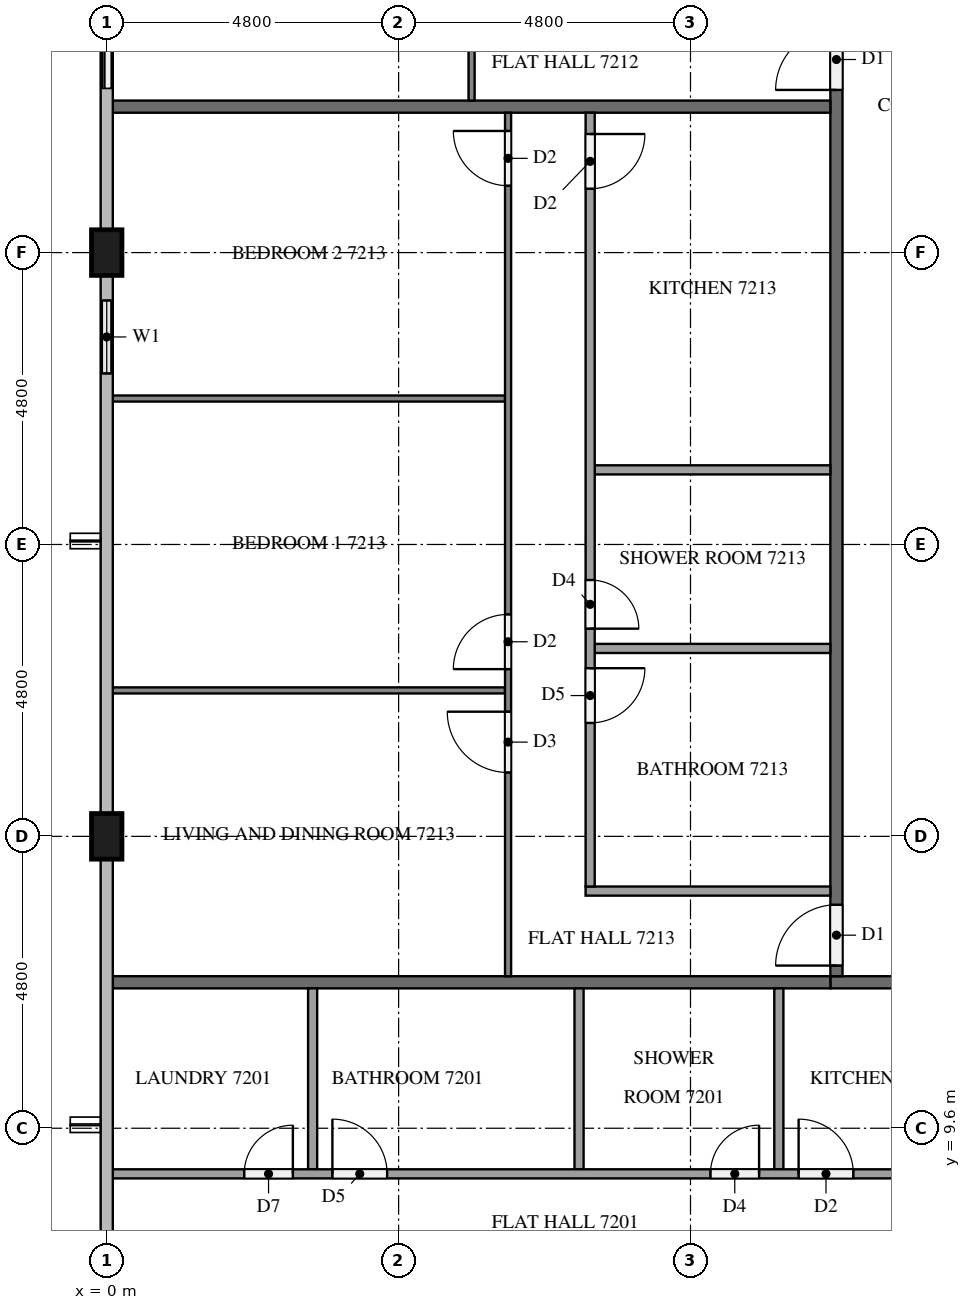
"""IFC4 building model, lengths in metres.
Left out: names, types, materials, properties, quantities, classifications, styles, units other than length and angle.
Written with IfcOpenShell. Run it as: python <this file> out.ifc"""

import sys

from ifc_helpers import new_model, si_unit, direction, frame, frame_2d, origin, origin_2d, place, context, subcontext, project, spatial, rectangle, extrude, element, fill, save


model = new_model("IFC4")
c1 = context("Model", 3, precision=1e-05, world=origin(), true_north=direction((0.0, 1.0)))
c2 = subcontext(c1, "Body", "Model", "MODEL_VIEW")
j1 = project(units=[si_unit("LENGTHUNIT", "METRE"), si_unit("PLANEANGLEUNIT", "RADIAN")], contexts=[c1])
p1 = place(None, origin())
s1 = spatial("IfcSite", under=j1, at=p1, CompositionType="ELEMENT")
p2 = place(p1, origin())
s2 = spatial("IfcBuilding", under=s1, at=p2, CompositionType="ELEMENT")
p3 = place(p2, frame((0.0, 0.0, 275.6)))
s3 = spatial("IfcBuildingStorey", under=s2, at=p3, CompositionType="ELEMENT", Elevation=275.6)
for number, where, z_axis, x_axis in (
    (1, (0.0, 24.0, 0.0), (0.0, 0.0, 1.0), (0.0, 1.0, 0.0)),
    (2, (0.0, 14.4, 0.0), (0.0, 0.0, 1.0), (0.0, 1.0, 0.0)),
):
    element("IfcColumn", number, at=place(p3, frame(where, z_axis=z_axis, x_axis=x_axis)), inside=s3, PredefinedType="COLUMN", context=c2, shape_type="SweptSolid", body=[
        extrude(rectangle(XDim=0.75, YDim=0.5, at=origin_2d()), origin(), (0.0, 0.0, 1.0), 3.2),
    ])
p4 = place(p3, frame((0.0, 28.8, 0.0), z_axis=(0.0, 0.0, 1.0), x_axis=(0.0, -1.0, 0.0)))
e3 = element("IfcWall", 3, at=p4, inside=s3, PredefinedType="SOLIDWALL", context=c2, shape_type="SweptSolid", body=[
    extrude(rectangle(XDim=2.4, YDim=0.15, at=frame_2d((1.2, 0.0))), origin(), (0.0, 0.0, 1.0), 3.2),
])
p5 = place(p4, frame((0.3, 0.0, 0.0)))
e4 = element("IfcOpeningElement", 4, at=p5, cuts=e3, PredefinedType="OPENING", context=c2, shape_type="SweptSolid", body=[
    extrude(rectangle(XDim=1.8, YDim=2.4, at=frame_2d((0.9, 1.2))), frame((0.0, 0.085, 0.0), z_axis=(0.0, -1.0, 0.0), x_axis=(1.0, 0.0, 0.0)), (0.0, 0.0, 1.0), 0.17),
])
p6 = place(p3, frame((0.0, 23.625, 0.0), z_axis=(0.0, 0.0, 1.0), x_axis=(0.0, -1.0, 0.0)))
e5 = element("IfcWall", 5, at=p6, inside=s3, PredefinedType="SOLIDWALL", context=c2, shape_type="SweptSolid", body=[
    extrude(rectangle(XDim=2.025, YDim=0.15, at=frame_2d((1.012, 0.0))), origin(), (0.0, 0.0, 1.0), 3.2),
])
p7 = place(p6, frame((0.413, 0.0, 0.9)))
e6 = element("IfcOpeningElement", 6, at=p7, cuts=e5, PredefinedType="OPENING", context=c2, shape_type="SweptSolid", body=[
    extrude(rectangle(XDim=1.2, YDim=1.4, at=frame_2d((0.6, 0.7))), frame((0.0, 0.085, 0.0), z_axis=(0.0, -1.0, 0.0), x_axis=(1.0, 0.0, 0.0)), (0.0, 0.0, 1.0), 0.17),
])
p8 = place(p3, frame((50.5, 12.0, 0.0), z_axis=(0.0, 0.0, 1.0), x_axis=(-1.0, 0.0, 0.0)))
e7 = element("IfcWall", 7, at=p8, inside=s3, PredefinedType="PARTITIONING", context=c2, shape_type="SweptSolid", body=[
    extrude(rectangle(XDim=38.6, YDim=0.2, at=frame_2d((19.3, 0.0))), origin(), (0.0, 0.0, 1.0), 3.2),
])
p9 = place(p8, frame((31.525, 0.0, 0.0)))
e8 = element("IfcOpeningElement", 8, at=p9, cuts=e7, PredefinedType="OPENING", context=c2, shape_type="SweptSolid", body=[
    extrude(rectangle(XDim=1.1, YDim=2.1, at=frame_2d((0.55, 1.05))), frame((0.0, 0.11, 0.0), z_axis=(0.0, -1.0, 0.0), x_axis=(1.0, 0.0, 0.0)), (0.0, 0.0, 1.0), 0.22),
])
p10 = place(p8, frame((19.575, 0.0, 0.0)))
e9 = element("IfcOpeningElement", 9, at=p10, cuts=e7, PredefinedType="OPENING", context=c2, shape_type="SweptSolid", body=[
    extrude(rectangle(XDim=1.0, YDim=2.1, at=frame_2d((0.5, 1.05))), frame((0.0, 0.11, 0.0), z_axis=(0.0, -1.0, 0.0), x_axis=(1.0, 0.0, 0.0)), (0.0, 0.0, 1.0), 0.22),
])
p11 = place(p8, frame((18.025, 0.0, 0.0)))
e10 = element("IfcOpeningElement", 10, at=p11, cuts=e7, PredefinedType="OPENING", context=c2, shape_type="SweptSolid", body=[
    extrude(rectangle(XDim=1.0, YDim=2.1, at=frame_2d((0.5, 1.05))), frame((0.0, 0.11, 0.0), z_axis=(0.0, -1.0, 0.0), x_axis=(1.0, 0.0, 0.0)), (0.0, 0.0, 1.0), 0.22),
])
p12 = place(p8, frame((1.225, 0.0, 0.0)))
e11 = element("IfcOpeningElement", 11, at=p12, cuts=e7, PredefinedType="OPENING", context=c2, shape_type="SweptSolid", body=[
    extrude(rectangle(XDim=1.0, YDim=2.1, at=frame_2d((0.5, 1.05))), frame((0.0, 0.11, 0.0), z_axis=(0.0, -1.0, 0.0), x_axis=(1.0, 0.0, 0.0)), (0.0, 0.0, 1.0), 0.22),
])
p13 = place(p3, frame((12.0, 12.1, 0.0), z_axis=(0.0, 0.0, 1.0), x_axis=(0.0, 1.0, 0.0)))
e12 = element("IfcWall", 12, at=p13, inside=s3, PredefinedType="PARTITIONING", context=c2, shape_type="SweptSolid", body=[
    extrude(rectangle(XDim=28.6, YDim=0.2, at=frame_2d((14.3, 0.0))), origin(), (0.0, 0.0, 1.0), 3.2),
])
p14 = place(p13, frame((24.175, 0.0, 0.0)))
e13 = element("IfcOpeningElement", 13, at=p14, cuts=e12, PredefinedType="OPENING", context=c2, shape_type="SweptSolid", body=[
    extrude(rectangle(XDim=1.0, YDim=2.1, at=frame_2d((0.5, 1.05))), frame((0.0, 0.11, 0.0), z_axis=(0.0, -1.0, 0.0), x_axis=(1.0, 0.0, 0.0)), (0.0, 0.0, 1.0), 0.22),
])
p15 = place(p13, frame((14.575, 0.0, 0.0)))
e14 = element("IfcOpeningElement", 14, at=p15, cuts=e12, PredefinedType="OPENING", context=c2, shape_type="SweptSolid", body=[
    extrude(rectangle(XDim=1.0, YDim=2.1, at=frame_2d((0.5, 1.05))), frame((0.0, 0.11, 0.0), z_axis=(0.0, -1.0, 0.0), x_axis=(1.0, 0.0, 0.0)), (0.0, 0.0, 1.0), 0.22),
])
p16 = place(p13, frame((0.175, 0.0, 0.0)))
e15 = element("IfcOpeningElement", 15, at=p16, cuts=e12, PredefinedType="OPENING", context=c2, shape_type="SweptSolid", body=[
    extrude(rectangle(XDim=1.0, YDim=2.1, at=frame_2d((0.5, 1.05))), frame((0.0, 0.11, 0.0), z_axis=(0.0, -1.0, 0.0), x_axis=(1.0, 0.0, 0.0)), (0.0, 0.0, 1.0), 0.22),
])
for number, where, z_axis, x_axis in (
    (16, (0.1, 12.0, 0.0), (0.0, 0.0, 1.0), (1.0, 0.0, 0.0)),
    (17, (0.1, 26.4, 0.0), (0.0, 0.0, 1.0), (1.0, 0.0, 0.0)),
):
    element("IfcWall", number, at=place(p3, frame(where, z_axis=z_axis, x_axis=x_axis)), inside=s3, PredefinedType="PARTITIONING", context=c2, shape_type="SweptSolid", body=[
        extrude(rectangle(XDim=11.8, YDim=0.2, at=frame_2d((5.9, 0.0))), origin(), (0.0, 0.0, 1.0), 3.2),
    ])
for number, where, z_axis, x_axis in (
    (18, (11.053, 11.9, 0.0), (0.0, 0.0, 1.0), (0.0, -1.0, 0.0)),
    (19, (7.767, 11.9, 0.0), (0.0, 0.0, 1.0), (0.0, -1.0, 0.0)),
    (20, (3.386, 11.9, 0.0), (0.0, 0.0, 1.0), (0.0, -1.0, 0.0)),
):
    element("IfcWall", number, at=place(p3, frame(where, z_axis=z_axis, x_axis=x_axis)), inside=s3, PredefinedType="PARTITIONING", context=c2, shape_type="SweptSolid", body=[
        extrude(rectangle(XDim=2.975, YDim=0.15, at=frame_2d((1.487, 0.0))), origin(), (0.0, 0.0, 1.0), 3.2),
    ])
p17 = place(p3, frame((0.1, 8.85, 0.0), z_axis=(0.0, 0.0, 1.0), x_axis=(1.0, 0.0, 0.0)))
e21 = element("IfcWall", 21, at=p17, inside=s3, PredefinedType="PARTITIONING", context=c2, shape_type="SweptSolid", body=[
    extrude(rectangle(XDim=17.525, YDim=0.15, at=frame_2d((8.762, 0.0))), origin(), (0.0, 0.0, 1.0), 3.2),
])
p18 = place(p17, frame((11.278, 0.0, 0.0)))
e22 = element("IfcOpeningElement", 22, at=p18, cuts=e21, PredefinedType="OPENING", context=c2, shape_type="SweptSolid", body=[
    extrude(rectangle(XDim=0.9, YDim=2.1, at=frame_2d((0.45, 1.05))), frame((0.0, 0.085, 0.0), z_axis=(0.0, -1.0, 0.0), x_axis=(1.0, 0.0, 0.0)), (0.0, 0.0, 1.0), 0.17),
])
p19 = place(p17, frame((9.828, 0.0, 0.0)))
e23 = element("IfcOpeningElement", 23, at=p19, cuts=e21, PredefinedType="OPENING", context=c2, shape_type="SweptSolid", body=[
    extrude(rectangle(XDim=0.8, YDim=2.1, at=frame_2d((0.4, 1.05))), frame((0.0, 0.085, 0.0), z_axis=(0.0, -1.0, 0.0), x_axis=(1.0, 0.0, 0.0)), (0.0, 0.0, 1.0), 0.17),
])
p20 = place(p17, frame((3.611, 0.0, 0.0)))
e24 = element("IfcOpeningElement", 24, at=p20, cuts=e21, PredefinedType="OPENING", context=c2, shape_type="SweptSolid", body=[
    extrude(rectangle(XDim=0.9, YDim=2.1, at=frame_2d((0.45, 1.05))), frame((0.0, 0.085, 0.0), z_axis=(0.0, -1.0, 0.0), x_axis=(1.0, 0.0, 0.0)), (0.0, 0.0, 1.0), 0.17),
])
p21 = place(p17, frame((2.161, 0.0, 0.0)))
e25 = element("IfcOpeningElement", 25, at=p21, cuts=e21, PredefinedType="OPENING", context=c2, shape_type="SweptSolid", body=[
    extrude(rectangle(XDim=0.8, YDim=2.1, at=frame_2d((0.4, 1.05))), frame((0.0, 0.085, 0.0), z_axis=(0.0, -1.0, 0.0), x_axis=(1.0, 0.0, 0.0)), (0.0, 0.0, 1.0), 0.17),
])
p22 = place(p3, frame((6.0, 26.5, 0.0), z_axis=(0.0, 0.0, 1.0), x_axis=(0.0, 1.0, 0.0)))
e26 = element("IfcWall", 26, at=p22, inside=s3, PredefinedType="PARTITIONING", context=c2, shape_type="SweptSolid", body=[
    extrude(rectangle(XDim=9.4, YDim=0.1, at=frame_2d((4.7, 0.0))), origin(), (0.0, 0.0, 1.0), 3.2),
])
p23 = place(p22, frame((3.35, 0.0, 0.0)))
e27 = element("IfcOpeningElement", 27, at=p23, cuts=e26, PredefinedType="OPENING", context=c2, shape_type="SweptSolid", body=[
    extrude(rectangle(XDim=1.0, YDim=2.1, at=frame_2d((0.5, 1.05))), frame((0.0, 0.06, 0.0), z_axis=(0.0, -1.0, 0.0), x_axis=(1.0, 0.0, 0.0)), (0.0, 0.0, 1.0), 0.12),
])
p24 = place(p22, frame((5.05, 0.0, 0.0)))
e28 = element("IfcOpeningElement", 28, at=p24, cuts=e26, PredefinedType="OPENING", context=c2, shape_type="SweptSolid", body=[
    extrude(rectangle(XDim=0.9, YDim=2.1, at=frame_2d((0.45, 1.05))), frame((0.0, 0.06, 0.0), z_axis=(0.0, -1.0, 0.0), x_axis=(1.0, 0.0, 0.0)), (0.0, 0.0, 1.0), 0.12),
])
for number, where, z_axis, x_axis in (
    (29, (6.55, 16.8, 0.0), (0.0, 0.0, 1.0), (-1.0, 0.0, 0.0)),
    (30, (6.55, 21.6, 0.0), (0.0, 0.0, 1.0), (-1.0, 0.0, 0.0)),
):
    element("IfcWall", number, at=place(p3, frame(where, z_axis=z_axis, x_axis=x_axis)), inside=s3, PredefinedType="PARTITIONING", context=c2, shape_type="SweptSolid", body=[
        extrude(rectangle(XDim=6.45, YDim=0.1, at=frame_2d((3.225, 0.0))), origin(), (0.0, 0.0, 1.0), 3.2),
    ])
p25 = place(p3, frame((6.6, 12.1, 0.0), z_axis=(0.0, 0.0, 1.0), x_axis=(0.0, 1.0, 0.0)))
e31 = element("IfcWall", 31, at=p25, inside=s3, PredefinedType="PARTITIONING", context=c2, shape_type="SweptSolid", body=[
    extrude(rectangle(XDim=14.2, YDim=0.1, at=frame_2d((7.1, 0.0))), origin(), (0.0, 0.0, 1.0), 3.2),
])
p26 = place(p25, frame((3.35, 0.0, 0.0)))
e32 = element("IfcOpeningElement", 32, at=p26, cuts=e31, PredefinedType="OPENING", context=c2, shape_type="SweptSolid", body=[
    extrude(rectangle(XDim=1.0, YDim=2.1, at=frame_2d((0.5, 1.05))), frame((0.0, 0.06, 0.0), z_axis=(0.0, -1.0, 0.0), x_axis=(1.0, 0.0, 0.0)), (0.0, 0.0, 1.0), 0.12),
])
p27 = place(p25, frame((5.05, 0.0, 0.0)))
e33 = element("IfcOpeningElement", 33, at=p27, cuts=e31, PredefinedType="OPENING", context=c2, shape_type="SweptSolid", body=[
    extrude(rectangle(XDim=0.9, YDim=2.1, at=frame_2d((0.45, 1.05))), frame((0.0, 0.06, 0.0), z_axis=(0.0, -1.0, 0.0), x_axis=(1.0, 0.0, 0.0)), (0.0, 0.0, 1.0), 0.12),
])
p28 = place(p25, frame((13.0, 0.0, 0.0)))
e34 = element("IfcOpeningElement", 34, at=p28, cuts=e31, PredefinedType="OPENING", context=c2, shape_type="SweptSolid", body=[
    extrude(rectangle(XDim=0.9, YDim=2.1, at=frame_2d((0.45, 1.05))), frame((0.0, 0.06, 0.0), z_axis=(0.0, -1.0, 0.0), x_axis=(1.0, 0.0, 0.0)), (0.0, 0.0, 1.0), 0.12),
])
for number, where, z_axis, x_axis in (
    (35, (11.9, 17.49, 0.0), (0.0, 0.0, 1.0), (-1.0, 0.0, 0.0)),
    (36, (11.9, 20.427, 0.0), (0.0, 0.0, 1.0), (-1.0, 0.0, 0.0)),
):
    element("IfcWall", number, at=place(p3, frame(where, z_axis=z_axis, x_axis=x_axis)), inside=s3, PredefinedType="PARTITIONING", context=c2, shape_type="SweptSolid", body=[
        extrude(rectangle(XDim=3.875, YDim=0.15, at=frame_2d((1.938, 0.0))), origin(), (0.0, 0.0, 1.0), 3.2),
    ])
p29 = place(p3, frame((11.9, 13.5, 0.0), z_axis=(0.0, 0.0, 1.0), x_axis=(-1.0, 0.0, 0.0)))
e37 = element("IfcWall", 37, at=p29, inside=s3, PredefinedType="PARTITIONING", context=c2, shape_type="SweptSolid", body=[
    extrude(rectangle(XDim=4.025, YDim=0.15, at=frame_2d((2.012, 0.0))), origin(), (0.0, 0.0, 1.0), 3.2),
])
p30 = place(p3, frame((7.95, 26.3, 0.0), z_axis=(0.0, 0.0, 1.0), x_axis=(0.0, -1.0, 0.0)))
e38 = element("IfcWall", 38, at=p30, inside=s3, PredefinedType="PARTITIONING", context=c2, shape_type="SweptSolid", body=[
    extrude(rectangle(XDim=12.725, YDim=0.15, at=frame_2d((6.363, 0.0))), origin(), (0.0, 0.0, 1.0), 3.2),
])
p31 = place(p30, frame((9.135, 0.0, 0.0)))
e39 = element("IfcOpeningElement", 39, at=p31, cuts=e38, PredefinedType="OPENING", context=c2, shape_type="SweptSolid", body=[
    extrude(rectangle(XDim=0.9, YDim=2.1, at=frame_2d((0.45, 1.05))), frame((0.0, 0.085, 0.0), z_axis=(0.0, -1.0, 0.0), x_axis=(1.0, 0.0, 0.0)), (0.0, 0.0, 1.0), 0.17),
])
p32 = place(p30, frame((7.685, 0.0, 0.0)))
e40 = element("IfcOpeningElement", 40, at=p32, cuts=e38, PredefinedType="OPENING", context=c2, shape_type="SweptSolid", body=[
    extrude(rectangle(XDim=0.8, YDim=2.1, at=frame_2d((0.4, 1.05))), frame((0.0, 0.085, 0.0), z_axis=(0.0, -1.0, 0.0), x_axis=(1.0, 0.0, 0.0)), (0.0, 0.0, 1.0), 0.17),
])
p33 = place(p30, frame((0.35, 0.0, 0.0)))
e41 = element("IfcOpeningElement", 41, at=p33, cuts=e38, PredefinedType="OPENING", context=c2, shape_type="SweptSolid", body=[
    extrude(rectangle(XDim=0.9, YDim=2.1, at=frame_2d((0.45, 1.05))), frame((0.0, 0.085, 0.0), z_axis=(0.0, -1.0, 0.0), x_axis=(1.0, 0.0, 0.0)), (0.0, 0.0, 1.0), 0.17),
])
p34 = place(p5, origin())
e42 = element("IfcDoor", 42, at=p34, inside=s3, OperationType="SLIDING_TO_RIGHT", PredefinedType="DOOR", context=c2, shape_type="SweptSolid", body=[
    extrude(rectangle(XDim=1.8, YDim=2.4, at=frame_2d((0.9, 1.2))), frame((0.0, 0.025, 0.0), z_axis=(0.0, -1.0, 0.0), x_axis=(1.0, 0.0, 0.0)), (0.0, 0.0, 1.0), 0.05),
])
fill(e4, e42)
p35 = place(p7, origin())
e43 = element("IfcWindow", 43, at=p35, inside=s3, PartitioningType="SINGLE_PANEL", PredefinedType="WINDOW", context=c2, shape_type="SweptSolid", body=[
    extrude(rectangle(XDim=1.2, YDim=1.4, at=frame_2d((0.6, 0.7))), frame((0.0, 0.03, 0.0), z_axis=(0.0, -1.0, 0.0), x_axis=(1.0, 0.0, 0.0)), (0.0, 0.0, 1.0), 0.06),
])
fill(e6, e43)
p36 = place(p15, origin())
e44 = element("IfcDoor", 44, at=p36, inside=s3, OperationType="SINGLE_SWING_LEFT", PredefinedType="DOOR", context=c2, shape_type="SweptSolid", body=[
    extrude(rectangle(XDim=1.0, YDim=2.1, at=frame_2d((0.5, 1.05))), frame((0.0, 0.025, 0.0), z_axis=(0.0, -1.0, 0.0), x_axis=(1.0, 0.0, 0.0)), (0.0, 0.0, 1.0), 0.05),
])
fill(e14, e44)
p37 = place(p16, origin())
e45 = element("IfcDoor", 45, at=p37, inside=s3, OperationType="SINGLE_SWING_LEFT", PredefinedType="DOOR", context=c2, shape_type="SweptSolid", body=[
    extrude(rectangle(XDim=1.0, YDim=2.1, at=frame_2d((0.5, 1.05))), frame((0.0, 0.025, 0.0), z_axis=(0.0, -1.0, 0.0), x_axis=(1.0, 0.0, 0.0)), (0.0, 0.0, 1.0), 0.05),
])
fill(e15, e45)
p38 = place(p18, origin())
e46 = element("IfcDoor", 46, at=p38, inside=s3, OperationType="SINGLE_SWING_LEFT", PredefinedType="DOOR", context=c2, shape_type="SweptSolid", body=[
    extrude(rectangle(XDim=0.9, YDim=2.1, at=frame_2d((0.45, 1.05))), frame((0.0, 0.025, 0.0), z_axis=(0.0, -1.0, 0.0), x_axis=(1.0, 0.0, 0.0)), (0.0, 0.0, 1.0), 0.05),
])
fill(e22, e46)
p39 = place(p19, origin())
e47 = element("IfcDoor", 47, at=p39, inside=s3, OperationType="SINGLE_SWING_RIGHT", PredefinedType="DOOR", context=c2, shape_type="SweptSolid", body=[
    extrude(rectangle(XDim=0.8, YDim=2.1, at=frame_2d((0.4, 1.05))), frame((0.0, 0.025, 0.0), z_axis=(0.0, -1.0, 0.0), x_axis=(1.0, 0.0, 0.0)), (0.0, 0.0, 1.0), 0.05),
])
fill(e23, e47)
p40 = place(p20, origin())
e48 = element("IfcDoor", 48, at=p40, inside=s3, OperationType="SINGLE_SWING_LEFT", PredefinedType="DOOR", context=c2, shape_type="SweptSolid", body=[
    extrude(rectangle(XDim=0.9, YDim=2.1, at=frame_2d((0.45, 1.05))), frame((0.0, 0.025, 0.0), z_axis=(0.0, -1.0, 0.0), x_axis=(1.0, 0.0, 0.0)), (0.0, 0.0, 1.0), 0.05),
])
fill(e24, e48)
p41 = place(p21, origin())
e49 = element("IfcDoor", 49, at=p41, inside=s3, OperationType="SINGLE_SWING_RIGHT", PredefinedType="DOOR", context=c2, shape_type="SweptSolid", body=[
    extrude(rectangle(XDim=0.8, YDim=2.1, at=frame_2d((0.4, 1.05))), frame((0.0, 0.025, 0.0), z_axis=(0.0, -1.0, 0.0), x_axis=(1.0, 0.0, 0.0)), (0.0, 0.0, 1.0), 0.05),
])
fill(e25, e49)
p42 = place(p26, origin())
e50 = element("IfcDoor", 50, at=p42, inside=s3, OperationType="SINGLE_SWING_RIGHT", PredefinedType="DOOR", context=c2, shape_type="SweptSolid", body=[
    extrude(rectangle(XDim=1.0, YDim=2.1, at=frame_2d((0.5, 1.05))), frame((0.0, 0.025, 0.0), z_axis=(0.0, -1.0, 0.0), x_axis=(1.0, 0.0, 0.0)), (0.0, 0.0, 1.0), 0.05),
])
fill(e32, e50)
p43 = place(p27, origin())
e51 = element("IfcDoor", 51, at=p43, inside=s3, OperationType="SINGLE_SWING_LEFT", PredefinedType="DOOR", context=c2, shape_type="SweptSolid", body=[
    extrude(rectangle(XDim=0.9, YDim=2.1, at=frame_2d((0.45, 1.05))), frame((0.0, 0.025, 0.0), z_axis=(0.0, -1.0, 0.0), x_axis=(1.0, 0.0, 0.0)), (0.0, 0.0, 1.0), 0.05),
])
fill(e33, e51)
p44 = place(p28, origin())
e52 = element("IfcDoor", 52, at=p44, inside=s3, OperationType="SINGLE_SWING_RIGHT", PredefinedType="DOOR", context=c2, shape_type="SweptSolid", body=[
    extrude(rectangle(XDim=0.9, YDim=2.1, at=frame_2d((0.45, 1.05))), frame((0.0, 0.025, 0.0), z_axis=(0.0, -1.0, 0.0), x_axis=(1.0, 0.0, 0.0)), (0.0, 0.0, 1.0), 0.05),
])
fill(e34, e52)
p45 = place(p31, origin())
e53 = element("IfcDoor", 53, at=p45, inside=s3, OperationType="SINGLE_SWING_LEFT", PredefinedType="DOOR", context=c2, shape_type="SweptSolid", body=[
    extrude(rectangle(XDim=0.9, YDim=2.1, at=frame_2d((0.45, 1.05))), frame((0.0, 0.025, 0.0), z_axis=(0.0, -1.0, 0.0), x_axis=(1.0, 0.0, 0.0)), (0.0, 0.0, 1.0), 0.05),
])
fill(e39, e53)
p46 = place(p32, origin())
e54 = element("IfcDoor", 54, at=p46, inside=s3, OperationType="SINGLE_SWING_RIGHT", PredefinedType="DOOR", context=c2, shape_type="SweptSolid", body=[
    extrude(rectangle(XDim=0.8, YDim=2.1, at=frame_2d((0.4, 1.05))), frame((0.0, 0.025, 0.0), z_axis=(0.0, -1.0, 0.0), x_axis=(1.0, 0.0, 0.0)), (0.0, 0.0, 1.0), 0.05),
])
fill(e40, e54)
p47 = place(p33, origin())
e55 = element("IfcDoor", 55, at=p47, inside=s3, OperationType="SINGLE_SWING_LEFT", PredefinedType="DOOR", context=c2, shape_type="SweptSolid", body=[
    extrude(rectangle(XDim=0.9, YDim=2.1, at=frame_2d((0.45, 1.05))), frame((0.0, 0.025, 0.0), z_axis=(0.0, -1.0, 0.0), x_axis=(1.0, 0.0, 0.0)), (0.0, 0.0, 1.0), 0.05),
])
fill(e41, e55)
save(model, sys.argv[1])
